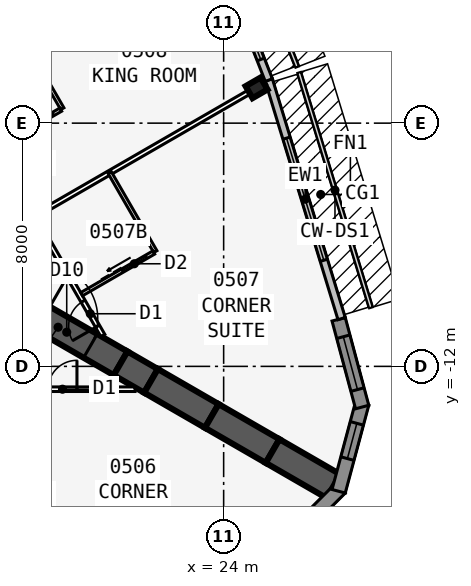
"""IFC4 building model, lengths in metres.
Left out: names, types, materials, properties, quantities, classifications, styles, units other than length and angle.
Written with IfcOpenShell. Run it as: python <this file> out.ifc"""

import sys

from ifc_helpers import new_model, si_unit, direction, frame, frame_2d, origin, origin_2d, place, context, subcontext, project, spatial, polyline, rectangle, i_section, outline, extrude, element, fill, save


model = new_model("IFC4")
c1 = context("Model", 3, precision=1e-05, world=origin(), true_north=direction((0.0, 1.0)))
c2 = subcontext(c1, "Body", "Model", "MODEL_VIEW")
j1 = project(units=[si_unit("LENGTHUNIT", "METRE"), si_unit("PLANEANGLEUNIT", "RADIAN")], contexts=[c1])
p1 = place(None, origin())
s1 = spatial("IfcSite", under=j1, at=p1, CompositionType="ELEMENT")
p2 = place(p1, origin())
s2 = spatial("IfcBuilding", under=s1, at=p2, CompositionType="ELEMENT")
p3 = place(p2, frame((0.0, 0.0, 28.5)))
s3 = spatial("IfcBuildingStorey", under=s2, at=p3, CompositionType="ELEMENT", Elevation=28.5)
p4 = place(p3, frame((16.5, -9.526, 0.0), z_axis=(0.0, 0.0, 1.0), x_axis=(0.866031398331, -0.499989616998, 0.0)))
e1 = element("IfcWall", 1, at=p4, inside=s3, PredefinedType="SHEAR", context=c2, shape_type="SweptSolid", body=[
    extrude(rectangle(XDim=4.746, YDim=0.9, at=frame_2d((2.373, 0.0))), origin(), (0.0, 0.0, 1.0), 3.4),
])
p5 = place(p4, frame((1.8, 0.0, 0.0)))
e2 = element("IfcOpeningElement", 2, at=p5, cuts=e1, PredefinedType="OPENING", context=c2, shape_type="SweptSolid", body=[
    extrude(rectangle(XDim=1.8, YDim=2.13, at=frame_2d((0.9, 1.065))), frame((0.0, 0.46, 0.0), z_axis=(0.0, -1.0, 0.0), x_axis=(1.0, 0.0, 0.0)), (0.0, 0.0, 1.0), 0.92),
])
p6 = place(p3, frame((20.61, -11.899, 0.0), z_axis=(0.0, 0.0, 1.0), x_axis=(0.866009537788, -0.500027479704, 0.0)))
e3 = element("IfcWall", 3, at=p6, inside=s3, PredefinedType="SHEAR", context=c2, shape_type="SweptSolid", body=[
    extrude(rectangle(XDim=1.155, YDim=0.9, at=frame_2d((0.577, 0.0))), origin(), (0.0, 0.0, 1.0), 3.4),
])
for number, where, z_axis, x_axis in (
    (4, (21.61, -12.477, 0.0), (0.0, 0.0, 1.0), (0.866, -0.5, 0.0)),
    (5, (23.61, -13.631, 0.0), (0.0, 0.0, 1.0), (0.866, -0.5, 0.0)),
    (6, (25.61, -14.786, 0.0), (0.0, 0.0, 1.0), (0.866, -0.5, 0.0)),
):
    element("IfcWall", number, at=place(p3, frame(where, z_axis=z_axis, x_axis=x_axis)), inside=s3, PredefinedType="SHEAR", context=c2, shape_type="SweptSolid", body=[
        extrude(rectangle(XDim=2.309, YDim=0.9, at=frame_2d((1.155, 0.0))), origin(), (0.0, 0.0, 1.0), 3.4),
    ])
p7 = place(p3, frame((25.083, -2.839, 0.0), z_axis=(0.0, 0.0, 1.0), x_axis=(-0.5, 0.866025403784, 0.0)))
e7 = element("IfcColumn", 7, at=p7, inside=s3, PredefinedType="COLUMN", context=c2, shape_type="SweptSolid", body=[
    extrude(i_section(OverallWidth=0.455, OverallDepth=0.569, WebThickness=0.078, FlangeThickness=0.125, at=origin_2d()), origin(), (0.0, 0.0, 1.0), 3.4),
])
p8 = place(p3, frame((25.728, -18.12, 0.0), z_axis=(0.0, 0.0, 1.0), x_axis=(0.707025086683, 0.707188466253, 0.0)))
e8 = element("IfcWall", 8, at=p8, inside=s3, PredefinedType="SOLIDWALL", context=c2, shape_type="SweptSolid", body=[
    extrude(outline(polyline([(2.989, 0.225), (2.93, 0.225), (2.438, 0.093), (2.402, 0.225), (0.0, 0.225), (0.0, -0.225), (2.989, -0.225), (2.989, 0.225)])), origin(), (0.0, 0.0, 1.0), 3.235),
])
p9 = place(p8, frame((0.676, 0.0, 0.45)))
e9 = element("IfcOpeningElement", 9, at=p9, cuts=e8, PredefinedType="OPENING", context=c2, shape_type="SweptSolid", body=[
    extrude(rectangle(XDim=1.2, YDim=2.4, at=frame_2d((0.6, 1.2))), frame((0.0, 0.235, 0.0), z_axis=(0.0, -1.0, 0.0), x_axis=(1.0, 0.0, 0.0)), (0.0, 0.0, 1.0), 0.47),
])
p10 = place(p3, frame((27.783, -16.108, 0.0), z_axis=(0.0, 0.0, 1.0), x_axis=(0.258801419081, 0.965930548995, 0.0)))
e10 = element("IfcWall", 10, at=p10, inside=s3, PredefinedType="SOLIDWALL", context=c2, shape_type="SweptSolid", body=[
    extrude(outline(polyline([(2.989, 0.225), (0.586, 0.225), (0.551, 0.093), (0.06, 0.225), (0.0, 0.225), (0.0, -0.225), (2.989, -0.225), (2.989, 0.225)])), origin(), (0.0, 0.0, 1.0), 3.235),
])
p11 = place(p10, frame((1.113, 0.0, 0.45)))
e11 = element("IfcOpeningElement", 11, at=p11, cuts=e10, PredefinedType="OPENING", context=c2, shape_type="SweptSolid", body=[
    extrude(rectangle(XDim=1.2, YDim=2.4, at=frame_2d((0.6, 1.2))), frame((0.0, 0.235, 0.0), z_axis=(0.0, -1.0, 0.0), x_axis=(1.0, 0.0, 0.0)), (0.0, 0.0, 1.0), 0.47),
])
p12 = place(p3, frame((28.556, -13.337, 0.0), z_axis=(0.0, 0.0, 1.0), x_axis=(-0.258780998834, 0.965936019953, 0.0)))
e12 = element("IfcWall", 12, at=p12, inside=s3, PredefinedType="SOLIDWALL", context=c2, shape_type="SweptSolid", body=[
    extrude(rectangle(XDim=2.989, YDim=0.45, at=frame_2d((1.494, 0.0))), origin(), (0.0, 0.0, 1.0), 3.235),
])
p13 = place(p12, frame((0.594, 0.0, 0.45)))
e13 = element("IfcOpeningElement", 13, at=p13, cuts=e12, PredefinedType="OPENING", context=c2, shape_type="SweptSolid", body=[
    extrude(rectangle(XDim=1.8, YDim=2.4, at=frame_2d((0.9, 1.2))), frame((0.0, 0.235, 0.0), z_axis=(0.0, -1.0, 0.0), x_axis=(1.0, 0.0, 0.0)), (0.0, 0.0, 1.0), 0.47),
])
p14 = place(p3, frame((27.88, -10.429, 0.0), z_axis=(0.0, 0.0, 1.0), x_axis=(-0.2919790669, 0.956424709265, 0.0)))
e14 = element("IfcWall", 14, at=p14, inside=s3, PredefinedType="STANDARD", context=c2, shape_type="SweptSolid", body=[
    extrude(rectangle(XDim=8.211, YDim=0.25, at=frame_2d((4.105, 0.0))), origin(), (0.0, 0.0, 1.0), 3.235),
])
p15 = place(p14, frame((2.006, 0.0, 0.45)))
e15 = element("IfcOpeningElement", 15, at=p15, cuts=e14, PredefinedType="OPENING", context=c2, shape_type="SweptSolid", body=[
    extrude(rectangle(XDim=4.2, YDim=2.4, at=frame_2d((2.1, 1.2))), frame((0.0, 0.135, 0.0), z_axis=(0.0, -1.0, 0.0), x_axis=(1.0, 0.0, 0.0)), (0.0, 0.0, 1.0), 0.27),
])
p16 = place(p3, frame((25.486, -2.584, 0.0), z_axis=(0.0, 0.0, 1.0), x_axis=(-0.364013463868, 0.931393685894, 0.0)))
e16 = element("IfcWall", 16, at=p16, inside=s3, PredefinedType="STANDARD", context=c2, shape_type="SweptSolid", body=[
    extrude(rectangle(XDim=5.058, YDim=0.25, at=frame_2d((2.529, 0.0))), origin(), (0.0, 0.0, 1.0), 3.235),
])
p17 = place(p16, frame((0.729, 0.0, 0.45)))
e17 = element("IfcOpeningElement", 17, at=p17, cuts=e16, PredefinedType="OPENING", context=c2, shape_type="SweptSolid", body=[
    extrude(rectangle(XDim=3.6, YDim=2.4, at=frame_2d((1.8, 1.2))), frame((0.0, 0.135, 0.0), z_axis=(0.0, -1.0, 0.0), x_axis=(1.0, 0.0, 0.0)), (0.0, 0.0, 1.0), 0.27),
])
p18 = place(p3, frame((-21.086, -12.751, 0.0), z_axis=(0.0, 0.0, 1.0), x_axis=(1.0, 0.0, 0.0)))
e18 = element("IfcWall", 18, at=p18, inside=s3, PredefinedType="PARTITIONING", context=c2, shape_type="SweptSolid", body=[
    extrude(rectangle(XDim=42.172, YDim=0.15, at=frame_2d((21.086, 0.0))), origin(), (0.0, 0.0, 1.0), 3.235),
])
p19 = place(p18, frame((2.338, 0.0, 0.0)))
e19 = element("IfcOpeningElement", 19, at=p19, cuts=e18, PredefinedType="OPENING", context=c2, shape_type="SweptSolid", body=[
    extrude(rectangle(XDim=0.95, YDim=2.13, at=frame_2d((0.475, 1.065))), frame((0.0, 0.085, 0.0), z_axis=(0.0, -1.0, 0.0), x_axis=(1.0, 0.0, 0.0)), (0.0, 0.0, 1.0), 0.17),
])
p20 = place(p18, frame((12.511, 0.0, 0.0)))
e20 = element("IfcOpeningElement", 20, at=p20, cuts=e18, PredefinedType="OPENING", context=c2, shape_type="SweptSolid", body=[
    extrude(rectangle(XDim=0.95, YDim=2.13, at=frame_2d((0.475, 1.065))), frame((0.0, 0.085, 0.0), z_axis=(0.0, -1.0, 0.0), x_axis=(1.0, 0.0, 0.0)), (0.0, 0.0, 1.0), 0.17),
])
p21 = place(p18, frame((18.711, 0.0, 0.0)))
e21 = element("IfcOpeningElement", 21, at=p21, cuts=e18, PredefinedType="OPENING", context=c2, shape_type="SweptSolid", body=[
    extrude(rectangle(XDim=0.95, YDim=2.13, at=frame_2d((0.475, 1.065))), frame((0.0, 0.085, 0.0), z_axis=(0.0, -1.0, 0.0), x_axis=(1.0, 0.0, 0.0)), (0.0, 0.0, 1.0), 0.17),
])
p22 = place(p18, frame((23.086, 0.0, 0.0)))
e22 = element("IfcOpeningElement", 22, at=p22, cuts=e18, PredefinedType="OPENING", context=c2, shape_type="SweptSolid", body=[
    extrude(rectangle(XDim=1.0, YDim=2.13, at=frame_2d((0.5, 1.065))), frame((0.0, 0.085, 0.0), z_axis=(0.0, -1.0, 0.0), x_axis=(1.0, 0.0, 0.0)), (0.0, 0.0, 1.0), 0.17),
])
p23 = place(p18, frame((27.511, 0.0, 0.0)))
e23 = element("IfcOpeningElement", 23, at=p23, cuts=e18, PredefinedType="OPENING", context=c2, shape_type="SweptSolid", body=[
    extrude(rectangle(XDim=0.95, YDim=2.13, at=frame_2d((0.475, 1.065))), frame((0.0, 0.085, 0.0), z_axis=(0.0, -1.0, 0.0), x_axis=(1.0, 0.0, 0.0)), (0.0, 0.0, 1.0), 0.17),
])
p24 = place(p18, frame((34.311, 0.0, 0.0)))
e24 = element("IfcOpeningElement", 24, at=p24, cuts=e18, PredefinedType="OPENING", context=c2, shape_type="SweptSolid", body=[
    extrude(rectangle(XDim=0.95, YDim=2.13, at=frame_2d((0.475, 1.065))), frame((0.0, 0.085, 0.0), z_axis=(0.0, -1.0, 0.0), x_axis=(1.0, 0.0, 0.0)), (0.0, 0.0, 1.0), 0.17),
])
p25 = place(p18, frame((39.311, 0.0, 0.0)))
e25 = element("IfcOpeningElement", 25, at=p25, cuts=e18, PredefinedType="OPENING", context=c2, shape_type="SweptSolid", body=[
    extrude(rectangle(XDim=0.95, YDim=2.13, at=frame_2d((0.475, 1.065))), frame((0.0, 0.085, 0.0), z_axis=(0.0, -1.0, 0.0), x_axis=(1.0, 0.0, 0.0)), (0.0, 0.0, 1.0), 0.17),
])
p26 = place(p3, frame((20.027, -10.985, 0.0), z_axis=(0.0, 0.0, 1.0), x_axis=(-0.500001677587, 0.866024435227, 0.0)))
e26 = element("IfcWall", 26, at=p26, inside=s3, PredefinedType="PARTITIONING", context=c2, shape_type="SweptSolid", body=[
    extrude(rectangle(XDim=39.054, YDim=0.15, at=frame_2d((19.527, 0.0))), origin(), (0.0, 0.0, 1.0), 3.235),
])
p27 = place(p26, frame((0.352, 0.0, 0.0)))
e27 = element("IfcOpeningElement", 27, at=p27, cuts=e26, PredefinedType="OPENING", context=c2, shape_type="SweptSolid", body=[
    extrude(rectangle(XDim=0.95, YDim=2.13, at=frame_2d((0.475, 1.065))), frame((0.0, 0.085, 0.0), z_axis=(0.0, -1.0, 0.0), x_axis=(1.0, 0.0, 0.0)), (0.0, 0.0, 1.0), 0.17),
])
p28 = place(p26, frame((5.952, 0.0, 0.0)))
e28 = element("IfcOpeningElement", 28, at=p28, cuts=e26, PredefinedType="OPENING", context=c2, shape_type="SweptSolid", body=[
    extrude(rectangle(XDim=0.95, YDim=2.13, at=frame_2d((0.475, 1.065))), frame((0.0, 0.085, 0.0), z_axis=(0.0, -1.0, 0.0), x_axis=(1.0, 0.0, 0.0)), (0.0, 0.0, 1.0), 0.17),
])
p29 = place(p26, frame((12.152, 0.0, 0.0)))
e29 = element("IfcOpeningElement", 29, at=p29, cuts=e26, PredefinedType="OPENING", context=c2, shape_type="SweptSolid", body=[
    extrude(rectangle(XDim=0.95, YDim=2.13, at=frame_2d((0.475, 1.065))), frame((0.0, 0.085, 0.0), z_axis=(0.0, -1.0, 0.0), x_axis=(1.0, 0.0, 0.0)), (0.0, 0.0, 1.0), 0.17),
])
p30 = place(p26, frame((15.952, 0.0, 0.0)))
e30 = element("IfcOpeningElement", 30, at=p30, cuts=e26, PredefinedType="OPENING", context=c2, shape_type="SweptSolid", body=[
    extrude(rectangle(XDim=0.95, YDim=2.13, at=frame_2d((0.475, 1.065))), frame((0.0, 0.085, 0.0), z_axis=(0.0, -1.0, 0.0), x_axis=(1.0, 0.0, 0.0)), (0.0, 0.0, 1.0), 0.17),
])
p31 = place(p26, frame((22.152, 0.0, 0.0)))
e31 = element("IfcOpeningElement", 31, at=p31, cuts=e26, PredefinedType="OPENING", context=c2, shape_type="SweptSolid", body=[
    extrude(rectangle(XDim=0.95, YDim=2.13, at=frame_2d((0.475, 1.065))), frame((0.0, 0.085, 0.0), z_axis=(0.0, -1.0, 0.0), x_axis=(1.0, 0.0, 0.0)), (0.0, 0.0, 1.0), 0.17),
])
p32 = place(p26, frame((25.952, 0.0, 0.0)))
e32 = element("IfcOpeningElement", 32, at=p32, cuts=e26, PredefinedType="OPENING", context=c2, shape_type="SweptSolid", body=[
    extrude(rectangle(XDim=0.95, YDim=2.13, at=frame_2d((0.475, 1.065))), frame((0.0, 0.085, 0.0), z_axis=(0.0, -1.0, 0.0), x_axis=(1.0, 0.0, 0.0)), (0.0, 0.0, 1.0), 0.17),
])
p33 = place(p26, frame((36.546, 0.0, 0.0)))
e33 = element("IfcOpeningElement", 33, at=p33, cuts=e26, PredefinedType="OPENING", context=c2, shape_type="SweptSolid", body=[
    extrude(rectangle(XDim=0.95, YDim=2.13, at=frame_2d((0.475, 1.065))), frame((0.0, 0.085, 0.0), z_axis=(0.0, -1.0, 0.0), x_axis=(1.0, 0.0, 0.0)), (0.0, 0.0, 1.0), 0.17),
])
p34 = place(p3, frame((17.829, -7.027, 0.0), z_axis=(0.0, 0.0, 1.0), x_axis=(0.866032659912, 0.499987431809, 0.0)))
e34 = element("IfcWall", 34, at=p34, inside=s3, PredefinedType="PARTITIONING", context=c2, shape_type="SweptSolid", body=[
    extrude(rectangle(XDim=8.72, YDim=0.15, at=frame_2d((4.36, 0.0))), origin(), (0.0, 0.0, 1.0), 2.389),
])
p35 = place(p3, frame((15.329, -2.697, 0.0), z_axis=(0.0, 0.0, 1.0), x_axis=(0.866018409083, 0.500012114982, 0.0)))
e35 = element("IfcWall", 35, at=p35, inside=s3, PredefinedType="PARTITIONING", context=c2, shape_type="SweptSolid", body=[
    extrude(rectangle(XDim=9.485, YDim=0.15, at=frame_2d((4.742, 0.0))), origin(), (0.0, 0.0, 1.0), 2.389),
])
p36 = place(p3, frame((21.753, -8.225, 0.0), z_axis=(0.0, 0.0, 1.0), x_axis=(-0.499990139034, 0.866031096941, 0.0)))
e36 = element("IfcWall", 36, at=p36, inside=s3, PredefinedType="PLUMBINGWALL", context=c2, shape_type="SweptSolid", body=[
    extrude(rectangle(XDim=3.0, YDim=0.12, at=frame_2d((1.5, 0.0))), origin(), (0.0, 0.0, 1.0), 3.235),
])
p37 = place(p3, frame((19.329, -9.625, 0.0), z_axis=(0.0, 0.0, 1.0), x_axis=(0.866035715982, 0.499982138324, 0.0)))
e37 = element("IfcWall", 37, at=p37, inside=s3, PredefinedType="PLUMBINGWALL", context=c2, shape_type="SweptSolid", body=[
    extrude(rectangle(XDim=2.74, YDim=0.12, at=frame_2d((1.37, 0.0))), origin(), (0.0, 0.0, 1.0), 3.235),
])
p38 = place(p37, frame((1.55, 0.0, 0.0)))
e38 = element("IfcOpeningElement", 38, at=p38, cuts=e37, PredefinedType="OPENING", context=c2, shape_type="SweptSolid", body=[
    extrude(rectangle(XDim=0.9, YDim=2.13, at=frame_2d((0.45, 1.065))), frame((0.0, 0.07, 0.0), z_axis=(0.0, -1.0, 0.0), x_axis=(1.0, 0.0, 0.0)), (0.0, 0.0, 1.0), 0.14),
])
p39 = place(p3, frame((18.694, -3.526, 0.0), z_axis=(0.0, 0.0, 1.0), x_axis=(-0.500033551112, 0.866006032174, 0.0)))
e39 = element("IfcWall", 39, at=p39, inside=s3, PredefinedType="PLUMBINGWALL", context=c2, shape_type="SweptSolid", body=[
    extrude(rectangle(XDim=2.4, YDim=0.12, at=frame_2d((1.2, 0.0))), origin(), (0.0, 0.0, 1.0), 3.235),
])
p40 = place(p3, frame((16.529, -4.776, 0.0), z_axis=(0.0, 0.0, 1.0), x_axis=(0.866023955769, 0.500002508028, 0.0)))
e40 = element("IfcWall", 40, at=p40, inside=s3, PredefinedType="PLUMBINGWALL", context=c2, shape_type="SweptSolid", body=[
    extrude(rectangle(XDim=2.44, YDim=0.12, at=frame_2d((1.22, 0.0))), origin(), (0.0, 0.0, 1.0), 3.235),
])
p41 = place(p40, frame((1.25, 0.0, 0.0)))
e41 = element("IfcOpeningElement", 41, at=p41, cuts=e40, PredefinedType="OPENING", context=c2, shape_type="SweptSolid", body=[
    extrude(rectangle(XDim=0.9, YDim=2.13, at=frame_2d((0.45, 1.065))), frame((0.0, 0.07, 0.0), z_axis=(0.0, -1.0, 0.0), x_axis=(1.0, 0.0, 0.0)), (0.0, 0.0, 1.0), 0.14),
])
p42 = place(p11, origin())
e42 = element("IfcWindow", 42, at=p42, inside=s3, PartitioningType="SINGLE_PANEL", PredefinedType="WINDOW", context=c2, shape_type="SweptSolid", body=[
    extrude(rectangle(XDim=1.2, YDim=2.4, at=frame_2d((0.6, 1.2))), frame((0.0, 0.03, 0.0), z_axis=(0.0, -1.0, 0.0), x_axis=(1.0, 0.0, 0.0)), (0.0, 0.0, 1.0), 0.06),
])
fill(e11, e42)
p43 = place(p13, origin())
e43 = element("IfcWindow", 43, at=p43, inside=s3, PartitioningType="SINGLE_PANEL", PredefinedType="WINDOW", context=c2, shape_type="SweptSolid", body=[
    extrude(rectangle(XDim=1.8, YDim=2.4, at=frame_2d((0.9, 1.2))), frame((0.0, 0.03, 0.0), z_axis=(0.0, -1.0, 0.0), x_axis=(1.0, 0.0, 0.0)), (0.0, 0.0, 1.0), 0.06),
])
fill(e13, e43)
p44 = place(p15, origin())
e44 = element("IfcWindow", 44, at=p44, inside=s3, PartitioningType="SINGLE_PANEL", PredefinedType="WINDOW", context=c2, shape_type="SweptSolid", body=[
    extrude(rectangle(XDim=4.2, YDim=2.4, at=frame_2d((2.1, 1.2))), frame((0.0, 0.03, 0.0), z_axis=(0.0, -1.0, 0.0), x_axis=(1.0, 0.0, 0.0)), (0.0, 0.0, 1.0), 0.06),
])
fill(e15, e44)
p45 = place(p17, origin())
e45 = element("IfcWindow", 45, at=p45, inside=s3, PartitioningType="SINGLE_PANEL", PredefinedType="WINDOW", context=c2, shape_type="SweptSolid", body=[
    extrude(rectangle(XDim=3.6, YDim=2.4, at=frame_2d((1.8, 1.2))), frame((0.0, 0.03, 0.0), z_axis=(0.0, -1.0, 0.0), x_axis=(1.0, 0.0, 0.0)), (0.0, 0.0, 1.0), 0.06),
])
fill(e17, e45)
p46 = place(p25, origin())
e46 = element("IfcDoor", 46, at=p46, inside=s3, OperationType="SINGLE_SWING_RIGHT", PredefinedType="DOOR", context=c2, shape_type="SweptSolid", body=[
    extrude(rectangle(XDim=0.95, YDim=2.13, at=frame_2d((0.475, 1.065))), frame((0.0, 0.025, 0.0), z_axis=(0.0, -1.0, 0.0), x_axis=(1.0, 0.0, 0.0)), (0.0, 0.0, 1.0), 0.05),
])
fill(e25, e46)
p47 = place(p38, origin())
e47 = element("IfcDoor", 47, at=p47, inside=s3, OperationType="SLIDING_TO_LEFT", PredefinedType="DOOR", context=c2, shape_type="SweptSolid", body=[
    extrude(rectangle(XDim=0.9, YDim=2.13, at=frame_2d((0.45, 1.065))), frame((0.0, 0.025, 0.0), z_axis=(0.0, -1.0, 0.0), x_axis=(1.0, 0.0, 0.0)), (0.0, 0.0, 1.0), 0.05),
])
fill(e38, e47)
p48 = place(p27, origin())
e48 = element("IfcDoor", 48, at=p48, inside=s3, OperationType="SINGLE_SWING_LEFT", PredefinedType="DOOR", context=c2, shape_type="SweptSolid", body=[
    extrude(rectangle(XDim=0.95, YDim=2.13, at=frame_2d((0.475, 1.065))), frame((0.0, 0.025, 0.0), z_axis=(0.0, -1.0, 0.0), x_axis=(1.0, 0.0, 0.0)), (0.0, 0.0, 1.0), 0.05),
])
fill(e27, e48)
p49 = place(p41, origin())
e49 = element("IfcDoor", 49, at=p49, inside=s3, OperationType="SLIDING_TO_LEFT", PredefinedType="DOOR", context=c2, shape_type="SweptSolid", body=[
    extrude(rectangle(XDim=0.9, YDim=2.13, at=frame_2d((0.45, 1.065))), frame((0.0, 0.025, 0.0), z_axis=(0.0, -1.0, 0.0), x_axis=(1.0, 0.0, 0.0)), (0.0, 0.0, 1.0), 0.05),
])
fill(e41, e49)
p50 = place(p5, origin())
e50 = element("IfcDoor", 50, at=p50, inside=s3, OperationType="DOUBLE_DOOR_DOUBLE_SWING", PredefinedType="DOOR", context=c2, shape_type="SweptSolid", body=[
    extrude(rectangle(XDim=1.8, YDim=2.13, at=frame_2d((0.9, 1.065))), frame((0.0, 0.025, 0.0), z_axis=(0.0, -1.0, 0.0), x_axis=(1.0, 0.0, 0.0)), (0.0, 0.0, 1.0), 0.05),
])
fill(e2, e50)
save(model, sys.argv[1])
